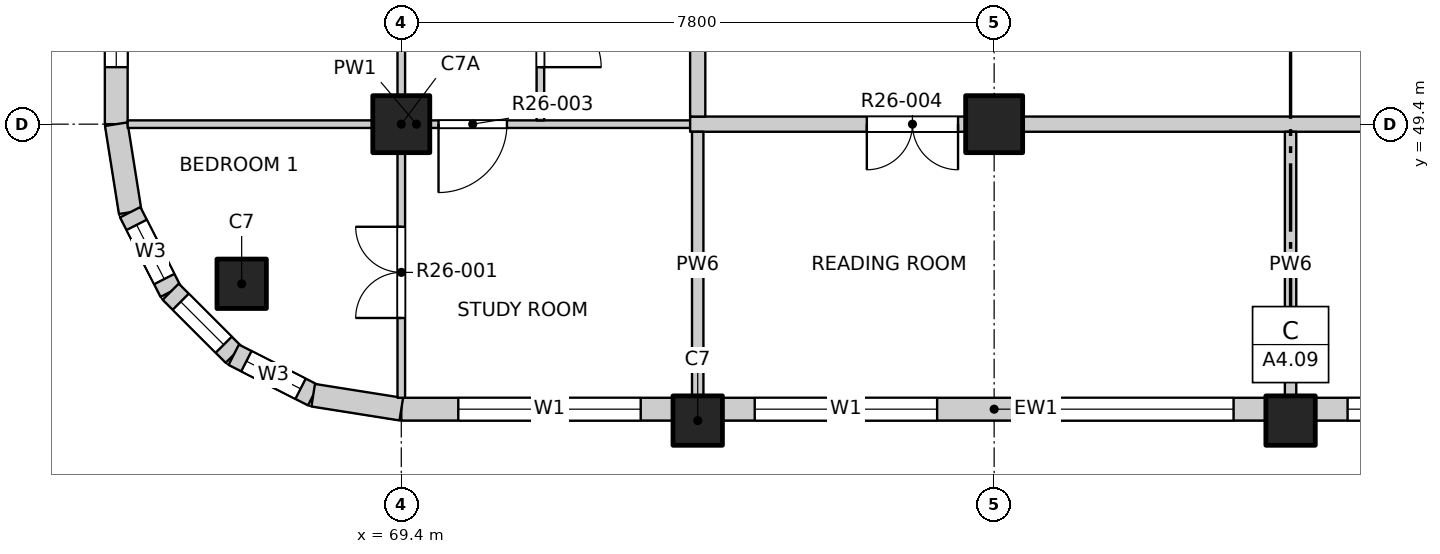
"""IFC4 building model, lengths in metres.
Left out: names, types, materials, properties, quantities, classifications, styles, units other than length and angle.
Written with IfcOpenShell. Run it as: python <this file> out.ifc"""

import sys

from ifc_helpers import new_model, si_unit, direction, frame, frame_2d, origin, origin_2d, place, context, subcontext, project, spatial, rectangle, extrude, element, fill, save


model = new_model("IFC4")
c1 = context("Model", 3, precision=1e-05, world=origin(), true_north=direction((0.0, 1.0)))
c2 = subcontext(c1, "Body", "Model", "MODEL_VIEW")
j1 = project(units=[si_unit("LENGTHUNIT", "METRE"), si_unit("PLANEANGLEUNIT", "RADIAN")], contexts=[c1])
p1 = place(None, origin())
s1 = spatial("IfcSite", under=j1, at=p1, CompositionType="ELEMENT")
p2 = place(p1, origin())
s2 = spatial("IfcBuilding", under=s1, at=p2, CompositionType="ELEMENT")
p3 = place(p2, frame((0.0, 0.0, 259.6)))
s3 = spatial("IfcBuildingStorey", under=s2, at=p3, CompositionType="ELEMENT", Elevation=259.6)
for number, where, z_axis, x_axis in (
    (1, (67.3, 47.3, -0.25), (0.0, 0.0, 1.0), (1.0, 0.0, 0.0)),
    (2, (73.3, 45.5, -0.25), (0.0, 0.0, 1.0), (1.0, 0.0, 0.0)),
    (3, (81.1, 45.5, -0.25), (0.0, 0.0, 1.0), (1.0, 0.0, 0.0)),
):
    element("IfcColumn", number, at=place(p3, frame(where, z_axis=z_axis, x_axis=x_axis)), inside=s3, PredefinedType="COLUMN", context=c2, shape_type="SweptSolid", body=[
        extrude(rectangle(XDim=0.65, YDim=0.65, at=origin_2d()), origin(), (0.0, 0.0, 1.0), 3.4),
    ])
for number, where, z_axis, x_axis in (
    (4, (69.4, 49.4, -0.25), (0.0, 0.0, 1.0), (1.0, 0.0, 0.0)),
    (5, (77.2, 49.4, -0.25), (0.0, 0.0, 1.0), (1.0, 0.0, 0.0)),
):
    element("IfcColumn", number, at=place(p3, frame(where, z_axis=z_axis, x_axis=x_axis)), inside=s3, PredefinedType="COLUMN", context=c2, shape_type="SweptSolid", body=[
        extrude(rectangle(XDim=0.75, YDim=0.75, at=origin_2d()), origin(), (0.0, 0.0, 1.0), 3.4),
    ])
p4 = place(p3, frame((69.4, 45.65, 0.0), z_axis=(0.0, 0.0, 1.0), x_axis=(1.0, 0.0, 0.0)))
e6 = element("IfcWall", 6, at=p4, inside=s3, PredefinedType="SOLIDWALL", context=c2, shape_type="SweptSolid", body=[
    extrude(rectangle(XDim=3.575, YDim=0.3, at=frame_2d((1.788, 0.0))), origin(), (0.0, 0.0, 1.0), 3.15),
])
p5 = place(p4, frame((0.75, 0.0, 0.9)))
e7 = element("IfcOpeningElement", 7, at=p5, cuts=e6, PredefinedType="OPENING", context=c2, shape_type="SweptSolid", body=[
    extrude(rectangle(XDim=2.4, YDim=1.8, at=frame_2d((1.2, 0.9))), frame((0.0, 0.16, 0.0), z_axis=(0.0, -1.0, 0.0), x_axis=(1.0, 0.0, 0.0)), (0.0, 0.0, 1.0), 0.32),
])
p6 = place(p3, frame((73.625, 45.65, 0.0), z_axis=(0.0, 0.0, 1.0), x_axis=(1.0, 0.0, 0.0)))
e8 = element("IfcWall", 8, at=p6, inside=s3, PredefinedType="SOLIDWALL", context=c2, shape_type="SweptSolid", body=[
    extrude(rectangle(XDim=7.15, YDim=0.3, at=frame_2d((3.575, 0.0))), origin(), (0.0, 0.0, 1.0), 3.15),
])
p7 = place(p6, frame((0.425, 0.0, 0.9)))
e9 = element("IfcOpeningElement", 9, at=p7, cuts=e8, PredefinedType="OPENING", context=c2, shape_type="SweptSolid", body=[
    extrude(rectangle(XDim=2.4, YDim=1.8, at=frame_2d((1.2, 0.9))), frame((0.0, 0.16, 0.0), z_axis=(0.0, -1.0, 0.0), x_axis=(1.0, 0.0, 0.0)), (0.0, 0.0, 1.0), 0.32),
])
p8 = place(p6, frame((4.325, 0.0, 0.9)))
e10 = element("IfcOpeningElement", 10, at=p8, cuts=e8, PredefinedType="OPENING", context=c2, shape_type="SweptSolid", body=[
    extrude(rectangle(XDim=2.4, YDim=1.8, at=frame_2d((1.2, 0.9))), frame((0.0, 0.16, 0.0), z_axis=(0.0, -1.0, 0.0), x_axis=(1.0, 0.0, 0.0)), (0.0, 0.0, 1.0), 0.32),
])
p9 = place(p3, frame((81.425, 45.65, 0.0), z_axis=(0.0, 0.0, 1.0), x_axis=(1.0, 0.0, 0.0)))
e11 = element("IfcWall", 11, at=p9, inside=s3, PredefinedType="SOLIDWALL", context=c2, shape_type="SweptSolid", body=[
    extrude(rectangle(XDim=7.15, YDim=0.3, at=frame_2d((3.575, 0.0))), origin(), (0.0, 0.0, 1.0), 3.15),
])
p10 = place(p9, frame((0.425, 0.0, 0.9)))
e12 = element("IfcOpeningElement", 12, at=p10, cuts=e11, PredefinedType="OPENING", context=c2, shape_type="SweptSolid", body=[
    extrude(rectangle(XDim=2.4, YDim=1.8, at=frame_2d((1.2, 0.9))), frame((0.0, 0.16, 0.0), z_axis=(0.0, -1.0, 0.0), x_axis=(1.0, 0.0, 0.0)), (0.0, 0.0, 1.0), 0.32),
])
p11 = place(p9, frame((4.325, 0.0, 0.9)))
e13 = element("IfcOpeningElement", 13, at=p11, cuts=e11, PredefinedType="OPENING", context=c2, shape_type="SweptSolid", body=[
    extrude(rectangle(XDim=2.4, YDim=1.8, at=frame_2d((1.2, 0.9))), frame((0.0, 0.16, 0.0), z_axis=(0.0, -1.0, 0.0), x_axis=(1.0, 0.0, 0.0)), (0.0, 0.0, 1.0), 0.32),
])
p12 = place(p3, frame((65.65, 49.4, 0.0), z_axis=(0.0, 0.0, 1.0), x_axis=(0.0, 1.0, 0.0)))
e14 = element("IfcWall", 14, at=p12, inside=s3, PredefinedType="SOLIDWALL", context=c2, shape_type="SweptSolid", body=[
    extrude(rectangle(XDim=3.575, YDim=0.3, at=frame_2d((1.788, 0.0))), origin(), (0.0, 0.0, 1.0), 3.15),
])
p13 = place(p12, frame((0.75, 0.0, 0.9)))
e15 = element("IfcOpeningElement", 15, at=p13, cuts=e14, PredefinedType="OPENING", context=c2, shape_type="SweptSolid", body=[
    extrude(rectangle(XDim=2.4, YDim=1.8, at=frame_2d((1.2, 0.9))), frame((0.0, 0.16, 0.0), z_axis=(0.0, -1.0, 0.0), x_axis=(1.0, 0.0, 0.0)), (0.0, 0.0, 1.0), 0.32),
])
p14 = place(p3, frame((65.65, 49.4, 0.0), z_axis=(0.0, 0.0, 1.0), x_axis=(0.156496880861, -0.987678452879, 0.0)))
e16 = element("IfcWall", 16, at=p14, inside=s3, PredefinedType="SOLIDWALL", context=c2, shape_type="SweptSolid", body=[
    extrude(rectangle(XDim=1.173, YDim=0.3, at=frame_2d((0.586, 0.0))), origin(), (0.0, 0.0, 1.0), 3.15),
])
p15 = place(p3, frame((65.833, 48.241, 0.0), z_axis=(0.0, 0.0, 1.0), x_axis=(0.454025524128, -0.890988677504, 0.0)))
e17 = element("IfcWall", 17, at=p15, inside=s3, PredefinedType="SOLIDWALL", context=c2, shape_type="SweptSolid", body=[
    extrude(rectangle(XDim=1.173, YDim=0.3, at=frame_2d((0.587, 0.0))), origin(), (0.0, 0.0, 1.0), 3.15),
])
p16 = place(p15, frame((0.187, 0.0, 0.9)))
e18 = element("IfcOpeningElement", 18, at=p16, cuts=e17, PredefinedType="OPENING", context=c2, shape_type="SweptSolid", body=[
    extrude(rectangle(XDim=0.8, YDim=1.2, at=frame_2d((0.4, 0.6))), frame((0.0, 0.16, 0.0), z_axis=(0.0, -1.0, 0.0), x_axis=(1.0, 0.0, 0.0)), (0.0, 0.0, 1.0), 0.32),
])
p17 = place(p3, frame((66.366, 47.196, 0.0), z_axis=(0.0, 0.0, 1.0), x_axis=(0.707106781187, -0.707106781187, 0.0)))
e19 = element("IfcWall", 19, at=p17, inside=s3, PredefinedType="SOLIDWALL", context=c2, shape_type="SweptSolid", body=[
    extrude(rectangle(XDim=1.173, YDim=0.3, at=frame_2d((0.586, 0.0))), origin(), (0.0, 0.0, 1.0), 3.15),
])
p18 = place(p17, frame((0.187, 0.0, 0.9)))
e20 = element("IfcOpeningElement", 20, at=p18, cuts=e19, PredefinedType="OPENING", context=c2, shape_type="SweptSolid", body=[
    extrude(rectangle(XDim=0.8, YDim=1.2, at=frame_2d((0.4, 0.6))), frame((0.0, 0.16, 0.0), z_axis=(0.0, -1.0, 0.0), x_axis=(1.0, 0.0, 0.0)), (0.0, 0.0, 1.0), 0.32),
])
p19 = place(p3, frame((67.196, 46.366, 0.0), z_axis=(0.0, 0.0, 1.0), x_axis=(0.890988677504, -0.454025524128, 0.0)))
e21 = element("IfcWall", 21, at=p19, inside=s3, PredefinedType="SOLIDWALL", context=c2, shape_type="SweptSolid", body=[
    extrude(rectangle(XDim=1.173, YDim=0.3, at=frame_2d((0.587, 0.0))), origin(), (0.0, 0.0, 1.0), 3.15),
])
p20 = place(p19, frame((0.187, 0.0, 0.9)))
e22 = element("IfcOpeningElement", 22, at=p20, cuts=e21, PredefinedType="OPENING", context=c2, shape_type="SweptSolid", body=[
    extrude(rectangle(XDim=0.8, YDim=1.2, at=frame_2d((0.4, 0.6))), frame((0.0, 0.16, 0.0), z_axis=(0.0, -1.0, 0.0), x_axis=(1.0, 0.0, 0.0)), (0.0, 0.0, 1.0), 0.32),
])
p21 = place(p3, frame((68.241, 45.833, 0.0), z_axis=(0.0, 0.0, 1.0), x_axis=(0.987678452879, -0.156496880861, 0.0)))
e23 = element("IfcWall", 23, at=p21, inside=s3, PredefinedType="SOLIDWALL", context=c2, shape_type="SweptSolid", body=[
    extrude(rectangle(XDim=1.173, YDim=0.3, at=frame_2d((0.586, 0.0))), origin(), (0.0, 0.0, 1.0), 3.15),
])
p22 = place(p3, frame((65.8, 49.4, 0.0), z_axis=(0.0, 0.0, 1.0), x_axis=(1.0, 0.0, 0.0)))
e24 = element("IfcWall", 24, at=p22, inside=s3, PredefinedType="PARTITIONING", context=c2, shape_type="SweptSolid", body=[
    extrude(rectangle(XDim=7.6, YDim=0.1, at=frame_2d((3.8, 0.0))), origin(), (0.0, 0.0, 1.0), 3.15),
])
p23 = place(p22, frame((4.09, 0.0, 0.0)))
e25 = element("IfcOpeningElement", 25, at=p23, cuts=e24, PredefinedType="OPENING", context=c2, shape_type="SweptSolid", body=[
    extrude(rectangle(XDim=0.9, YDim=2.1, at=frame_2d((0.45, 1.05))), frame((0.0, 0.06, 0.0), z_axis=(0.0, -1.0, 0.0), x_axis=(1.0, 0.0, 0.0)), (0.0, 0.0, 1.0), 0.12),
])
p24 = place(p3, frame((73.2, 49.4, 0.0), z_axis=(0.0, 0.0, 1.0), x_axis=(1.0, 0.0, 0.0)))
e26 = element("IfcWall", 26, at=p24, inside=s3, PredefinedType="PARTITIONING", context=c2, shape_type="SweptSolid", body=[
    extrude(rectangle(XDim=23.6, YDim=0.2, at=frame_2d((11.8, 0.0))), origin(), (0.0, 0.0, 1.0), 3.15),
])
p25 = place(p24, frame((2.325, 0.0, 0.0)))
e27 = element("IfcOpeningElement", 27, at=p25, cuts=e26, PredefinedType="OPENING", context=c2, shape_type="SweptSolid", body=[
    extrude(rectangle(XDim=1.2, YDim=2.1, at=frame_2d((0.6, 1.05))), frame((0.0, 0.11, 0.0), z_axis=(0.0, -1.0, 0.0), x_axis=(1.0, 0.0, 0.0)), (0.0, 0.0, 1.0), 0.22),
])
p26 = place(p24, frame((15.1, 0.0, 0.0)))
e28 = element("IfcOpeningElement", 28, at=p26, cuts=e26, PredefinedType="OPENING", context=c2, shape_type="SweptSolid", body=[
    extrude(rectangle(XDim=1.2, YDim=2.1, at=frame_2d((0.6, 1.05))), frame((0.0, 0.11, 0.0), z_axis=(0.0, -1.0, 0.0), x_axis=(1.0, 0.0, 0.0)), (0.0, 0.0, 1.0), 0.22),
])
p27 = place(p3, frame((69.4, 45.8, 0.0), z_axis=(0.0, 0.0, 1.0), x_axis=(0.0, 1.0, 0.0)))
e29 = element("IfcWall", 29, at=p27, inside=s3, PredefinedType="PARTITIONING", context=c2, shape_type="SweptSolid", body=[
    extrude(rectangle(XDim=38.4, YDim=0.1, at=frame_2d((19.2, 0.0))), origin(), (0.0, 0.0, 1.0), 3.15),
])
p28 = place(p27, frame((1.05, 0.0, 0.0)))
e30 = element("IfcOpeningElement", 30, at=p28, cuts=e29, PredefinedType="OPENING", context=c2, shape_type="SweptSolid", body=[
    extrude(rectangle(XDim=1.2, YDim=2.1, at=frame_2d((0.6, 1.05))), frame((0.0, 0.06, 0.0), z_axis=(0.0, -1.0, 0.0), x_axis=(1.0, 0.0, 0.0)), (0.0, 0.0, 1.0), 0.12),
])
p29 = place(p27, frame((5.1, 0.0, 0.0)))
e31 = element("IfcOpeningElement", 31, at=p29, cuts=e29, PredefinedType="OPENING", context=c2, shape_type="SweptSolid", body=[
    extrude(rectangle(XDim=0.9, YDim=2.1, at=frame_2d((0.45, 1.05))), frame((0.0, 0.06, 0.0), z_axis=(0.0, -1.0, 0.0), x_axis=(1.0, 0.0, 0.0)), (0.0, 0.0, 1.0), 0.12),
])
p30 = place(p27, frame((9.0, 0.0, 0.0)))
e32 = element("IfcOpeningElement", 32, at=p30, cuts=e29, PredefinedType="OPENING", context=c2, shape_type="SweptSolid", body=[
    extrude(rectangle(XDim=0.9, YDim=2.1, at=frame_2d((0.45, 1.05))), frame((0.0, 0.06, 0.0), z_axis=(0.0, -1.0, 0.0), x_axis=(1.0, 0.0, 0.0)), (0.0, 0.0, 1.0), 0.12),
])
p31 = place(p27, frame((12.9, 0.0, 0.0)))
e33 = element("IfcOpeningElement", 33, at=p31, cuts=e29, PredefinedType="OPENING", context=c2, shape_type="SweptSolid", body=[
    extrude(rectangle(XDim=0.9, YDim=2.1, at=frame_2d((0.45, 1.05))), frame((0.0, 0.06, 0.0), z_axis=(0.0, -1.0, 0.0), x_axis=(1.0, 0.0, 0.0)), (0.0, 0.0, 1.0), 0.12),
])
p32 = place(p27, frame((16.8, 0.0, 0.0)))
e34 = element("IfcOpeningElement", 34, at=p32, cuts=e29, PredefinedType="OPENING", context=c2, shape_type="SweptSolid", body=[
    extrude(rectangle(XDim=0.9, YDim=2.1, at=frame_2d((0.45, 1.05))), frame((0.0, 0.06, 0.0), z_axis=(0.0, -1.0, 0.0), x_axis=(1.0, 0.0, 0.0)), (0.0, 0.0, 1.0), 0.12),
])
p33 = place(p27, frame((20.7, 0.0, 0.0)))
e35 = element("IfcOpeningElement", 35, at=p33, cuts=e29, PredefinedType="OPENING", context=c2, shape_type="SweptSolid", body=[
    extrude(rectangle(XDim=0.9, YDim=2.1, at=frame_2d((0.45, 1.05))), frame((0.0, 0.06, 0.0), z_axis=(0.0, -1.0, 0.0), x_axis=(1.0, 0.0, 0.0)), (0.0, 0.0, 1.0), 0.12),
])
p34 = place(p27, frame((24.6, 0.0, 0.0)))
e36 = element("IfcOpeningElement", 36, at=p34, cuts=e29, PredefinedType="OPENING", context=c2, shape_type="SweptSolid", body=[
    extrude(rectangle(XDim=0.9, YDim=2.1, at=frame_2d((0.45, 1.05))), frame((0.0, 0.06, 0.0), z_axis=(0.0, -1.0, 0.0), x_axis=(1.0, 0.0, 0.0)), (0.0, 0.0, 1.0), 0.12),
])
p35 = place(p27, frame((30.3, 0.0, 0.0)))
e37 = element("IfcOpeningElement", 37, at=p35, cuts=e29, PredefinedType="OPENING", context=c2, shape_type="SweptSolid", body=[
    extrude(rectangle(XDim=1.2, YDim=2.1, at=frame_2d((0.6, 1.05))), frame((0.0, 0.06, 0.0), z_axis=(0.0, -1.0, 0.0), x_axis=(1.0, 0.0, 0.0)), (0.0, 0.0, 1.0), 0.12),
])
p36 = place(p27, frame((36.15, 0.0, 0.0)))
e38 = element("IfcOpeningElement", 38, at=p36, cuts=e29, PredefinedType="OPENING", context=c2, shape_type="SweptSolid", body=[
    extrude(rectangle(XDim=1.2, YDim=2.1, at=frame_2d((0.6, 1.05))), frame((0.0, 0.06, 0.0), z_axis=(0.0, -1.0, 0.0), x_axis=(1.0, 0.0, 0.0)), (0.0, 0.0, 1.0), 0.12),
])
p37 = place(p3, frame((71.23, 49.45, 0.0), z_axis=(0.0, 0.0, 1.0), x_axis=(0.0, 1.0, 0.0)))
e39 = element("IfcWall", 39, at=p37, inside=s3, PredefinedType="PARTITIONING", context=c2, shape_type="SweptSolid", body=[
    extrude(rectangle(XDim=10.0, YDim=0.1, at=frame_2d((5.0, 0.0))), origin(), (0.0, 0.0, 1.0), 3.15),
])
p38 = place(p37, frame((0.7, 0.0, 0.0)))
e40 = element("IfcOpeningElement", 40, at=p38, cuts=e39, PredefinedType="OPENING", context=c2, shape_type="SweptSolid", body=[
    extrude(rectangle(XDim=0.8, YDim=2.1, at=frame_2d((0.4, 1.05))), frame((0.0, 0.06, 0.0), z_axis=(0.0, -1.0, 0.0), x_axis=(1.0, 0.0, 0.0)), (0.0, 0.0, 1.0), 0.12),
])
p39 = place(p37, frame((3.6, 0.0, 0.0)))
e41 = element("IfcOpeningElement", 41, at=p39, cuts=e39, PredefinedType="OPENING", context=c2, shape_type="SweptSolid", body=[
    extrude(rectangle(XDim=0.9, YDim=2.1, at=frame_2d((0.45, 1.05))), frame((0.0, 0.06, 0.0), z_axis=(0.0, -1.0, 0.0), x_axis=(1.0, 0.0, 0.0)), (0.0, 0.0, 1.0), 0.12),
])
p40 = place(p37, frame((6.3, 0.0, 0.0)))
e42 = element("IfcOpeningElement", 42, at=p40, cuts=e39, PredefinedType="OPENING", context=c2, shape_type="SweptSolid", body=[
    extrude(rectangle(XDim=0.9, YDim=2.1, at=frame_2d((0.45, 1.05))), frame((0.0, 0.06, 0.0), z_axis=(0.0, -1.0, 0.0), x_axis=(1.0, 0.0, 0.0)), (0.0, 0.0, 1.0), 0.12),
])
p41 = place(p37, frame((8.4, 0.0, 0.0)))
e43 = element("IfcOpeningElement", 43, at=p41, cuts=e39, PredefinedType="OPENING", context=c2, shape_type="SweptSolid", body=[
    extrude(rectangle(XDim=0.9, YDim=2.1, at=frame_2d((0.45, 1.05))), frame((0.0, 0.06, 0.0), z_axis=(0.0, -1.0, 0.0), x_axis=(1.0, 0.0, 0.0)), (0.0, 0.0, 1.0), 0.12),
])
p42 = place(p3, frame((73.3, 45.8, 0.0), z_axis=(0.0, 0.0, 1.0), x_axis=(0.0, 1.0, 0.0)))
e44 = element("IfcWall", 44, at=p42, inside=s3, PredefinedType="PARTITIONING", context=c2, shape_type="SweptSolid", body=[
    extrude(rectangle(XDim=3.5, YDim=0.15, at=frame_2d((1.75, 0.0))), origin(), (0.0, 0.0, 1.0), 3.15),
])
p43 = place(p3, frame((73.3, 49.5, 0.0), z_axis=(0.0, 0.0, 1.0), x_axis=(0.0, 1.0, 0.0)))
e45 = element("IfcWall", 45, at=p43, inside=s3, PredefinedType="PARTITIONING", context=c2, shape_type="SweptSolid", body=[
    extrude(rectangle(XDim=34.7, YDim=0.2, at=frame_2d((17.35, 0.0))), origin(), (0.0, 0.0, 1.0), 3.15),
])
p44 = place(p43, frame((11.275, 0.0, 0.0)))
e46 = element("IfcOpeningElement", 46, at=p44, cuts=e45, PredefinedType="OPENING", context=c2, shape_type="SweptSolid", body=[
    extrude(rectangle(XDim=1.0, YDim=2.1, at=frame_2d((0.5, 1.05))), frame((0.0, 0.11, 0.0), z_axis=(0.0, -1.0, 0.0), x_axis=(1.0, 0.0, 0.0)), (0.0, 0.0, 1.0), 0.22),
])
p45 = place(p43, frame((29.125, 0.0, 0.0)))
e47 = element("IfcOpeningElement", 47, at=p45, cuts=e45, PredefinedType="OPENING", context=c2, shape_type="SweptSolid", body=[
    extrude(rectangle(XDim=1.0, YDim=2.1, at=frame_2d((0.5, 1.05))), frame((0.0, 0.11, 0.0), z_axis=(0.0, -1.0, 0.0), x_axis=(1.0, 0.0, 0.0)), (0.0, 0.0, 1.0), 0.22),
])
p46 = place(p3, frame((81.1, 45.8, 0.0), z_axis=(0.0, 0.0, 1.0), x_axis=(0.0, 1.0, 0.0)))
e48 = element("IfcWall", 48, at=p46, inside=s3, PredefinedType="PARTITIONING", context=c2, shape_type="SweptSolid", body=[
    extrude(rectangle(XDim=3.5, YDim=0.15, at=frame_2d((1.75, 0.0))), origin(), (0.0, 0.0, 1.0), 3.15),
])
p47 = place(p5, origin())
e49 = element("IfcWindow", 49, at=p47, inside=s3, PartitioningType="DOUBLE_PANEL_VERTICAL", PredefinedType="WINDOW", context=c2, shape_type="SweptSolid", body=[
    extrude(rectangle(XDim=2.4, YDim=1.8, at=frame_2d((1.2, 0.9))), frame((0.0, 0.03, 0.0), z_axis=(0.0, -1.0, 0.0), x_axis=(1.0, 0.0, 0.0)), (0.0, 0.0, 1.0), 0.06),
])
fill(e7, e49)
p48 = place(p7, origin())
e50 = element("IfcWindow", 50, at=p48, inside=s3, PartitioningType="DOUBLE_PANEL_VERTICAL", PredefinedType="WINDOW", context=c2, shape_type="SweptSolid", body=[
    extrude(rectangle(XDim=2.4, YDim=1.8, at=frame_2d((1.2, 0.9))), frame((0.0, 0.03, 0.0), z_axis=(0.0, -1.0, 0.0), x_axis=(1.0, 0.0, 0.0)), (0.0, 0.0, 1.0), 0.06),
])
fill(e9, e50)
p49 = place(p8, origin())
e51 = element("IfcWindow", 51, at=p49, inside=s3, PartitioningType="DOUBLE_PANEL_VERTICAL", PredefinedType="WINDOW", context=c2, shape_type="SweptSolid", body=[
    extrude(rectangle(XDim=2.4, YDim=1.8, at=frame_2d((1.2, 0.9))), frame((0.0, 0.03, 0.0), z_axis=(0.0, -1.0, 0.0), x_axis=(1.0, 0.0, 0.0)), (0.0, 0.0, 1.0), 0.06),
])
fill(e10, e51)
p50 = place(p10, origin())
e52 = element("IfcWindow", 52, at=p50, inside=s3, PartitioningType="DOUBLE_PANEL_VERTICAL", PredefinedType="WINDOW", context=c2, shape_type="SweptSolid", body=[
    extrude(rectangle(XDim=2.4, YDim=1.8, at=frame_2d((1.2, 0.9))), frame((0.0, 0.03, 0.0), z_axis=(0.0, -1.0, 0.0), x_axis=(1.0, 0.0, 0.0)), (0.0, 0.0, 1.0), 0.06),
])
fill(e12, e52)
p51 = place(p13, origin())
e53 = element("IfcWindow", 53, at=p51, inside=s3, PartitioningType="DOUBLE_PANEL_VERTICAL", PredefinedType="WINDOW", context=c2, shape_type="SweptSolid", body=[
    extrude(rectangle(XDim=2.4, YDim=1.8, at=frame_2d((1.2, 0.9))), frame((0.0, 0.03, 0.0), z_axis=(0.0, -1.0, 0.0), x_axis=(1.0, 0.0, 0.0)), (0.0, 0.0, 1.0), 0.06),
])
fill(e15, e53)
p52 = place(p16, origin())
e54 = element("IfcWindow", 54, at=p52, inside=s3, PartitioningType="SINGLE_PANEL", PredefinedType="WINDOW", context=c2, shape_type="SweptSolid", body=[
    extrude(rectangle(XDim=0.8, YDim=1.2, at=frame_2d((0.4, 0.6))), frame((0.0, 0.03, 0.0), z_axis=(0.0, -1.0, 0.0), x_axis=(1.0, 0.0, 0.0)), (0.0, 0.0, 1.0), 0.06),
])
fill(e18, e54)
p53 = place(p18, origin())
e55 = element("IfcWindow", 55, at=p53, inside=s3, PartitioningType="SINGLE_PANEL", PredefinedType="WINDOW", context=c2, shape_type="SweptSolid", body=[
    extrude(rectangle(XDim=0.8, YDim=1.2, at=frame_2d((0.4, 0.6))), frame((0.0, 0.03, 0.0), z_axis=(0.0, -1.0, 0.0), x_axis=(1.0, 0.0, 0.0)), (0.0, 0.0, 1.0), 0.06),
])
fill(e20, e55)
p54 = place(p20, origin())
e56 = element("IfcWindow", 56, at=p54, inside=s3, PartitioningType="SINGLE_PANEL", PredefinedType="WINDOW", context=c2, shape_type="SweptSolid", body=[
    extrude(rectangle(XDim=0.8, YDim=1.2, at=frame_2d((0.4, 0.6))), frame((0.0, 0.03, 0.0), z_axis=(0.0, -1.0, 0.0), x_axis=(1.0, 0.0, 0.0)), (0.0, 0.0, 1.0), 0.06),
])
fill(e22, e56)
p55 = place(p28, origin())
e57 = element("IfcDoor", 57, at=p55, inside=s3, OperationType="DOUBLE_DOOR_SINGLE_SWING", PredefinedType="DOOR", context=c2, shape_type="SweptSolid", body=[
    extrude(rectangle(XDim=1.2, YDim=2.1, at=frame_2d((0.6, 1.05))), frame((0.0, 0.025, 0.0), z_axis=(0.0, -1.0, 0.0), x_axis=(1.0, 0.0, 0.0)), (0.0, 0.0, 1.0), 0.05),
])
fill(e30, e57)
p56 = place(p23, origin())
e58 = element("IfcDoor", 58, at=p56, inside=s3, OperationType="SINGLE_SWING_RIGHT", PredefinedType="DOOR", context=c2, shape_type="SweptSolid", body=[
    extrude(rectangle(XDim=0.9, YDim=2.1, at=frame_2d((0.45, 1.05))), frame((0.0, 0.025, 0.0), z_axis=(0.0, -1.0, 0.0), x_axis=(1.0, 0.0, 0.0)), (0.0, 0.0, 1.0), 0.05),
])
fill(e25, e58)
p57 = place(p25, origin())
e59 = element("IfcDoor", 59, at=p57, inside=s3, OperationType="DOUBLE_DOOR_SINGLE_SWING", PredefinedType="DOOR", context=c2, shape_type="SweptSolid", body=[
    extrude(rectangle(XDim=1.2, YDim=2.1, at=frame_2d((0.6, 1.05))), frame((0.0, 0.025, 0.0), z_axis=(0.0, -1.0, 0.0), x_axis=(1.0, 0.0, 0.0)), (0.0, 0.0, 1.0), 0.05),
])
fill(e27, e59)
p58 = place(p38, origin())
e60 = element("IfcDoor", 60, at=p58, inside=s3, OperationType="SINGLE_SWING_RIGHT", PredefinedType="DOOR", context=c2, shape_type="SweptSolid", body=[
    extrude(rectangle(XDim=0.8, YDim=2.1, at=frame_2d((0.4, 1.05))), frame((0.0, 0.025, 0.0), z_axis=(0.0, -1.0, 0.0), x_axis=(1.0, 0.0, 0.0)), (0.0, 0.0, 1.0), 0.05),
])
fill(e40, e60)
save(model, sys.argv[1])
